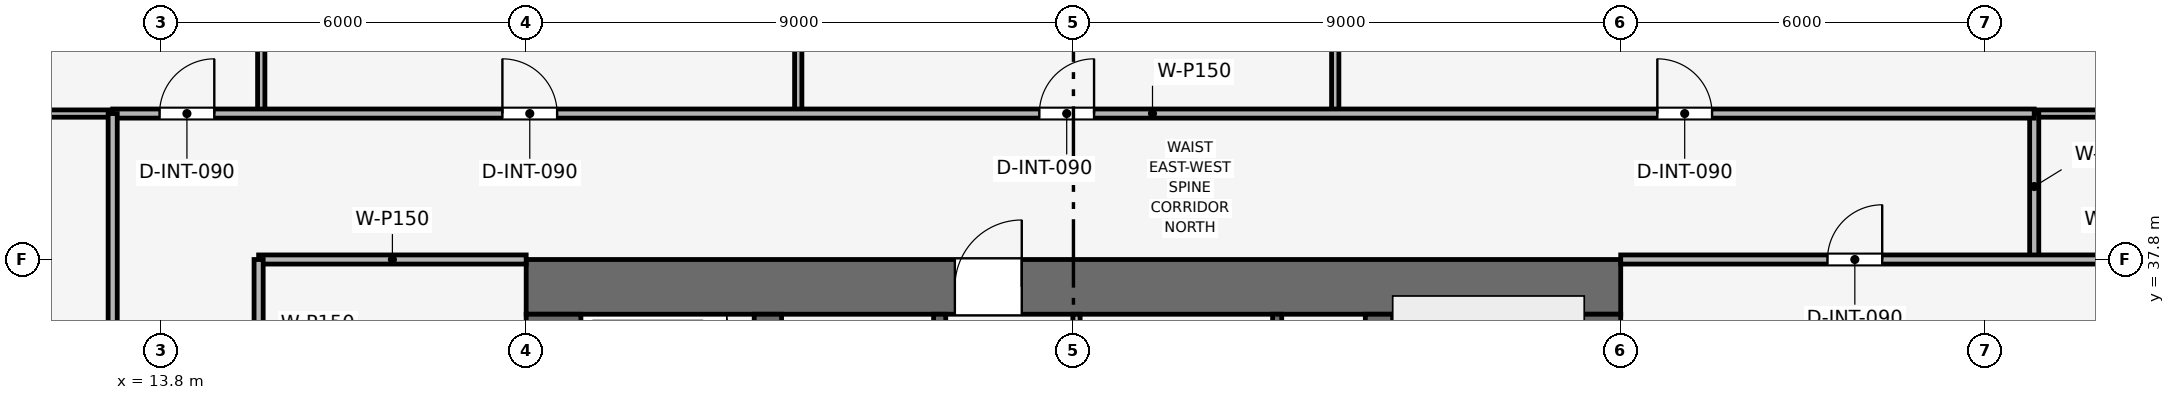
"""IFC4 building model, lengths in metres.
Left out: names, types, materials, properties, quantities, classifications, styles, units other than length and angle.
Written with IfcOpenShell. Run it as: python <this file> out.ifc"""

import sys

from ifc_helpers import new_model, si_unit, direction, frame, frame_2d, origin, place, context, subcontext, project, spatial, rectangle, extrude, element, fill, save


model = new_model("IFC4")
c1 = context("Model", 3, precision=1e-05, world=origin(), true_north=direction((0.0, 1.0)))
c2 = subcontext(c1, "Body", "Model", "MODEL_VIEW")
j1 = project(units=[si_unit("LENGTHUNIT", "METRE"), si_unit("PLANEANGLEUNIT", "RADIAN")], contexts=[c1])
p1 = place(None, origin())
s1 = spatial("IfcSite", under=j1, at=p1, CompositionType="ELEMENT")
p2 = place(p1, origin())
s2 = spatial("IfcBuilding", under=s1, at=p2, CompositionType="ELEMENT")
p3 = place(p2, frame((0.0, 0.0, 164.55)))
s3 = spatial("IfcBuildingStorey", under=s2, at=p3, CompositionType="ELEMENT", Elevation=164.55)
p4 = place(p3, frame((19.8, 37.35, 0.0), z_axis=(0.0, 0.0, 1.0), x_axis=(1.0, 0.0, 0.0)))
e1 = element("IfcWall", 1, at=p4, inside=s3, PredefinedType="SHEAR", context=c2, shape_type="SweptSolid", body=[
    extrude(rectangle(XDim=18.0, YDim=0.9, at=frame_2d((9.0, 0.0))), origin(), (0.0, 0.0, 1.0), 3.75),
])
p5 = place(p4, frame((7.05, 0.0, 0.0)))
e2 = element("IfcOpeningElement", 2, at=p5, cuts=e1, PredefinedType="OPENING", context=c2, shape_type="SweptSolid", body=[
    extrude(rectangle(XDim=1.1, YDim=2.15, at=frame_2d((0.55, 1.075))), frame((0.0, 0.46, 0.0), z_axis=(0.0, -1.0, 0.0), x_axis=(1.0, 0.0, 0.0)), (0.0, 0.0, 1.0), 0.92),
])
p6 = place(p3, frame((20.25, 20.7, 0.0), z_axis=(0.0, 0.0, 1.0), x_axis=(0.0, 1.0, 0.0)))
e3 = element("IfcWall", 3, at=p6, inside=s3, PredefinedType="SHEAR", context=c2, shape_type="SweptSolid", body=[
    extrude(rectangle(XDim=16.2, YDim=0.9, at=frame_2d((8.1, 0.0))), origin(), (0.0, 0.0, 1.0), 3.75),
])
p7 = place(p6, frame((10.1, 0.0, 0.0)))
e4 = element("IfcOpeningElement", 4, at=p7, cuts=e3, PredefinedType="OPENING", context=c2, shape_type="SweptSolid", body=[
    extrude(rectangle(XDim=1.1, YDim=2.15, at=frame_2d((0.55, 1.075))), frame((0.0, 0.46, 0.0), z_axis=(0.0, -1.0, 0.0), x_axis=(1.0, 0.0, 0.0)), (0.0, 0.0, 1.0), 0.92),
])
p8 = place(p3, frame((37.35, 20.7, 0.0), z_axis=(0.0, 0.0, 1.0), x_axis=(0.0, 1.0, 0.0)))
e5 = element("IfcWall", 5, at=p8, inside=s3, PredefinedType="SHEAR", context=c2, shape_type="SweptSolid", body=[
    extrude(rectangle(XDim=16.2, YDim=0.9, at=frame_2d((8.1, 0.0))), origin(), (0.0, 0.0, 1.0), 3.75),
])
p9 = place(p8, frame((4.6, 0.0, 0.0)))
e6 = element("IfcOpeningElement", 6, at=p9, cuts=e5, PredefinedType="OPENING", context=c2, shape_type="SweptSolid", body=[
    extrude(rectangle(XDim=1.1, YDim=2.15, at=frame_2d((0.55, 1.075))), frame((0.0, 0.46, 0.0), z_axis=(0.0, -1.0, 0.0), x_axis=(1.0, 0.0, 0.0)), (0.0, 0.0, 1.0), 0.92),
])
for number, where, z_axis, x_axis in (
    (7, (23.775, 20.7, 0.0), (0.0, 0.0, 1.0), (0.0, 1.0, 0.0)),
    (8, (33.825, 20.7, 0.0), (0.0, 0.0, 1.0), (0.0, 1.0, 0.0)),
):
    element("IfcWall", number, at=place(p3, frame(where, z_axis=z_axis, x_axis=x_axis)), inside=s3, PredefinedType="SHEAR", context=c2, shape_type="SweptSolid", body=[
        extrude(rectangle(XDim=16.2, YDim=0.45, at=frame_2d((8.1, 0.0))), origin(), (0.0, 0.0, 1.0), 3.75),
    ])
p10 = place(p3, frame((32.15, 34.0, 0.0), z_axis=(0.0, 0.0, 1.0), x_axis=(0.0, 1.0, 0.0)))
e9 = element("IfcWall", 9, at=p10, inside=s3, PredefinedType="SHEAR", context=c2, shape_type="SweptSolid", body=[
    extrude(rectangle(XDim=2.9, YDim=0.15, at=frame_2d((1.45, 0.0))), origin(), (0.0, 0.0, 1.0), 3.495),
])
p11 = place(p3, frame((26.6, 34.0, 0.0), z_axis=(0.0, 0.0, 1.0), x_axis=(0.0, 1.0, 0.0)))
e10 = element("IfcWall", 10, at=p11, inside=s3, PredefinedType="SHEAR", context=c2, shape_type="SweptSolid", body=[
    extrude(rectangle(XDim=2.9, YDim=0.2, at=frame_2d((1.45, 0.0))), origin(), (0.0, 0.0, 1.0), 3.495),
])
p12 = place(p11, frame((0.75, 0.0, 0.0)))
e11 = element("IfcOpeningElement", 11, at=p12, cuts=e10, PredefinedType="OPENING", context=c2, shape_type="SweptSolid", body=[
    extrude(rectangle(XDim=1.1, YDim=2.15, at=frame_2d((0.55, 1.075))), frame((0.0, 0.11, 0.0), z_axis=(0.0, -1.0, 0.0), x_axis=(1.0, 0.0, 0.0)), (0.0, 0.0, 1.0), 0.22),
])
p13 = place(p3, frame((28.85, 33.925, 0.0), z_axis=(0.0, 0.0, 1.0), x_axis=(0.0, 1.0, 0.0)))
e12 = element("IfcWall", 12, at=p13, inside=s3, PredefinedType="PARTITIONING", context=c2, shape_type="SweptSolid", body=[
    extrude(rectangle(XDim=2.975, YDim=0.12, at=frame_2d((1.487, 0.0))), origin(), (0.0, 0.0, 1.0), 3.495),
])
p14 = place(p13, frame((0.25, 0.0, 0.0)))
e13 = element("IfcOpeningElement", 13, at=p14, cuts=e12, PredefinedType="OPENING", context=c2, shape_type="SweptSolid", body=[
    extrude(rectangle(XDim=0.85, YDim=2.1, at=frame_2d((0.425, 1.05))), frame((0.0, 0.07, 0.0), z_axis=(0.0, -1.0, 0.0), x_axis=(1.0, 0.0, 0.0)), (0.0, 0.0, 1.0), 0.14),
])
p15 = place(p13, frame((1.645, 0.0, 0.0)))
e14 = element("IfcOpeningElement", 14, at=p15, cuts=e12, PredefinedType="OPENING", context=c2, shape_type="SweptSolid", body=[
    extrude(rectangle(XDim=0.85, YDim=2.1, at=frame_2d((0.425, 1.05))), frame((0.0, 0.07, 0.0), z_axis=(0.0, -1.0, 0.0), x_axis=(1.0, 0.0, 0.0)), (0.0, 0.0, 1.0), 0.14),
])
p16 = place(p3, frame((15.4, 37.8, 0.0), z_axis=(0.0, 0.0, 1.0), x_axis=(1.0, 0.0, 0.0)))
e15 = element("IfcWall", 15, at=p16, inside=s3, PredefinedType="PARTITIONING", context=c2, shape_type="SweptSolid", body=[
    extrude(rectangle(XDim=4.4, YDim=0.15, at=frame_2d((2.2, 0.0))), origin(), (0.0, 0.0, 1.0), 3.03),
])
p17 = place(p3, frame((15.4, 32.45, 0.0), z_axis=(0.0, 0.0, 1.0), x_axis=(0.0, 1.0, 0.0)))
e16 = element("IfcWall", 16, at=p17, inside=s3, PredefinedType="PARTITIONING", context=c2, shape_type="SweptSolid", body=[
    extrude(rectangle(XDim=5.35, YDim=0.15, at=frame_2d((2.675, 0.0))), origin(), (0.0, 0.0, 1.0), 3.03),
])
p18 = place(p17, frame((2.1, 0.0, 0.0)))
e17 = element("IfcOpeningElement", 17, at=p18, cuts=e16, PredefinedType="OPENING", context=c2, shape_type="SweptSolid", body=[
    extrude(rectangle(XDim=0.9, YDim=2.1, at=frame_2d((0.45, 1.05))), frame((0.0, 0.085, 0.0), z_axis=(0.0, -1.0, 0.0), x_axis=(1.0, 0.0, 0.0)), (0.0, 0.0, 1.0), 0.17),
])
for number, where, z_axis, x_axis in (
    (18, (15.443, 40.2, 0.0), (0.0, 0.0, 1.0), (0.0, 1.0, 0.0)),
    (19, (24.274, 40.2, 0.0), (0.0, 0.0, 1.0), (0.0, 1.0, 0.0)),
    (20, (33.105, 40.2, 0.0), (0.0, 0.0, 1.0), (0.0, 1.0, 0.0)),
):
    element("IfcWall", number, at=place(p3, frame(where, z_axis=z_axis, x_axis=x_axis)), inside=s3, PredefinedType="PARTITIONING", context=c2, shape_type="SweptSolid", body=[
        extrude(rectangle(XDim=12.77, YDim=0.12, at=frame_2d((6.385, 0.0))), origin(), (0.0, 0.0, 1.0), 2.98),
    ])
p19 = place(p3, frame((4.63, 40.2, 0.0), z_axis=(0.0, 0.0, 1.0), x_axis=(1.0, 0.0, 0.0)))
e21 = element("IfcWall", 21, at=p19, inside=s3, PredefinedType="PARTITIONING", context=c2, shape_type="SweptSolid", body=[
    extrude(rectangle(XDim=8.37, YDim=0.12, at=frame_2d((4.185, 0.0))), origin(), (0.0, 0.0, 1.0), 2.98),
])
p20 = place(p3, frame((44.6, 40.2, 0.0), z_axis=(0.0, 0.0, 1.0), x_axis=(1.0, 0.0, 0.0)))
e22 = element("IfcWall", 22, at=p20, inside=s3, PredefinedType="PARTITIONING", context=c2, shape_type="SweptSolid", body=[
    extrude(rectangle(XDim=8.37, YDim=0.12, at=frame_2d((4.185, 0.0))), origin(), (0.0, 0.0, 1.0), 2.98),
])
p21 = place(p3, frame((44.6, 37.8, 0.0), z_axis=(0.0, 0.0, 1.0), x_axis=(0.0, 1.0, 0.0)))
e23 = element("IfcWall", 23, at=p21, inside=s3, PredefinedType="PARTITIONING", context=c2, shape_type="SweptSolid", body=[
    extrude(rectangle(XDim=2.4, YDim=0.15, at=frame_2d((1.2, 0.0))), origin(), (0.0, 0.0, 1.0), 3.495),
])
p22 = place(p3, frame((37.8, 37.8, 0.0), z_axis=(0.0, 0.0, 1.0), x_axis=(1.0, 0.0, 0.0)))
e24 = element("IfcWall", 24, at=p22, inside=s3, PredefinedType="PARTITIONING", context=c2, shape_type="SweptSolid", body=[
    extrude(rectangle(XDim=15.17, YDim=0.15, at=frame_2d((7.585, 0.0))), origin(), (0.0, 0.0, 1.0), 2.98),
])
p23 = place(p22, frame((3.4, 0.0, 0.0)))
e25 = element("IfcOpeningElement", 25, at=p23, cuts=e24, PredefinedType="OPENING", context=c2, shape_type="SweptSolid", body=[
    extrude(rectangle(XDim=0.9, YDim=2.1, at=frame_2d((0.45, 1.05))), frame((0.0, 0.085, 0.0), z_axis=(0.0, -1.0, 0.0), x_axis=(1.0, 0.0, 0.0)), (0.0, 0.0, 1.0), 0.17),
])
p24 = place(p3, frame((13.0, 40.2, 0.0), z_axis=(0.0, 0.0, 1.0), x_axis=(1.0, 0.0, 0.0)))
e26 = element("IfcWall", 26, at=p24, inside=s3, PredefinedType="PARTITIONING", context=c2, shape_type="SweptSolid", body=[
    extrude(rectangle(XDim=31.6, YDim=0.15, at=frame_2d((15.8, 0.0))), origin(), (0.0, 0.0, 1.0), 3.03),
])
p25 = place(p24, frame((0.771, 0.0, 0.0)))
e27 = element("IfcOpeningElement", 27, at=p25, cuts=e26, PredefinedType="OPENING", context=c2, shape_type="SweptSolid", body=[
    extrude(rectangle(XDim=0.9, YDim=2.1, at=frame_2d((0.45, 1.05))), frame((0.0, 0.085, 0.0), z_axis=(0.0, -1.0, 0.0), x_axis=(1.0, 0.0, 0.0)), (0.0, 0.0, 1.0), 0.17),
])
p26 = place(p24, frame((6.409, 0.0, 0.0)))
e28 = element("IfcOpeningElement", 28, at=p26, cuts=e26, PredefinedType="OPENING", context=c2, shape_type="SweptSolid", body=[
    extrude(rectangle(XDim=0.9, YDim=2.1, at=frame_2d((0.45, 1.05))), frame((0.0, 0.085, 0.0), z_axis=(0.0, -1.0, 0.0), x_axis=(1.0, 0.0, 0.0)), (0.0, 0.0, 1.0), 0.17),
])
p27 = place(p24, frame((15.239, 0.0, 0.0)))
e29 = element("IfcOpeningElement", 29, at=p27, cuts=e26, PredefinedType="OPENING", context=c2, shape_type="SweptSolid", body=[
    extrude(rectangle(XDim=0.9, YDim=2.1, at=frame_2d((0.45, 1.05))), frame((0.0, 0.085, 0.0), z_axis=(0.0, -1.0, 0.0), x_axis=(1.0, 0.0, 0.0)), (0.0, 0.0, 1.0), 0.17),
])
p28 = place(p24, frame((25.402, 0.0, 0.0)))
e30 = element("IfcOpeningElement", 30, at=p28, cuts=e26, PredefinedType="OPENING", context=c2, shape_type="SweptSolid", body=[
    extrude(rectangle(XDim=0.9, YDim=2.1, at=frame_2d((0.45, 1.05))), frame((0.0, 0.085, 0.0), z_axis=(0.0, -1.0, 0.0), x_axis=(1.0, 0.0, 0.0)), (0.0, 0.0, 1.0), 0.17),
])
p29 = place(p3, frame((13.0, 17.4, 0.0), z_axis=(0.0, 0.0, 1.0), x_axis=(0.0, 1.0, 0.0)))
e31 = element("IfcWall", 31, at=p29, inside=s3, PredefinedType="PARTITIONING", context=c2, shape_type="SweptSolid", body=[
    extrude(rectangle(XDim=22.8, YDim=0.15, at=frame_2d((11.4, 0.0))), origin(), (0.0, 0.0, 1.0), 3.03),
])
p30 = place(p29, frame((6.115, 0.0, 0.0)))
e32 = element("IfcOpeningElement", 32, at=p30, cuts=e31, PredefinedType="OPENING", context=c2, shape_type="SweptSolid", body=[
    extrude(rectangle(XDim=0.9, YDim=2.1, at=frame_2d((0.45, 1.05))), frame((0.0, 0.085, 0.0), z_axis=(0.0, -1.0, 0.0), x_axis=(1.0, 0.0, 0.0)), (0.0, 0.0, 1.0), 0.17),
])
p31 = place(p29, frame((15.115, 0.0, 0.0)))
e33 = element("IfcOpeningElement", 33, at=p31, cuts=e31, PredefinedType="OPENING", context=c2, shape_type="SweptSolid", body=[
    extrude(rectangle(XDim=0.9, YDim=2.1, at=frame_2d((0.45, 1.05))), frame((0.0, 0.085, 0.0), z_axis=(0.0, -1.0, 0.0), x_axis=(1.0, 0.0, 0.0)), (0.0, 0.0, 1.0), 0.17),
])
p32 = place(p23, origin())
e34 = element("IfcDoor", 34, at=p32, inside=s3, OperationType="SINGLE_SWING_RIGHT", PredefinedType="DOOR", context=c2, shape_type="SweptSolid", body=[
    extrude(rectangle(XDim=0.9, YDim=2.1, at=frame_2d((0.45, 1.05))), frame((0.0, 0.025, 0.0), z_axis=(0.0, -1.0, 0.0), x_axis=(1.0, 0.0, 0.0)), (0.0, 0.0, 1.0), 0.05),
])
fill(e25, e34)
p33 = place(p25, origin())
e35 = element("IfcDoor", 35, at=p33, inside=s3, OperationType="SINGLE_SWING_RIGHT", PredefinedType="DOOR", context=c2, shape_type="SweptSolid", body=[
    extrude(rectangle(XDim=0.9, YDim=2.1, at=frame_2d((0.45, 1.05))), frame((0.0, 0.025, 0.0), z_axis=(0.0, -1.0, 0.0), x_axis=(1.0, 0.0, 0.0)), (0.0, 0.0, 1.0), 0.05),
])
fill(e27, e35)
p34 = place(p26, origin())
e36 = element("IfcDoor", 36, at=p34, inside=s3, OperationType="SINGLE_SWING_LEFT", PredefinedType="DOOR", context=c2, shape_type="SweptSolid", body=[
    extrude(rectangle(XDim=0.9, YDim=2.1, at=frame_2d((0.45, 1.05))), frame((0.0, 0.025, 0.0), z_axis=(0.0, -1.0, 0.0), x_axis=(1.0, 0.0, 0.0)), (0.0, 0.0, 1.0), 0.05),
])
fill(e28, e36)
p35 = place(p27, origin())
e37 = element("IfcDoor", 37, at=p35, inside=s3, OperationType="SINGLE_SWING_RIGHT", PredefinedType="DOOR", context=c2, shape_type="SweptSolid", body=[
    extrude(rectangle(XDim=0.9, YDim=2.1, at=frame_2d((0.45, 1.05))), frame((0.0, 0.025, 0.0), z_axis=(0.0, -1.0, 0.0), x_axis=(1.0, 0.0, 0.0)), (0.0, 0.0, 1.0), 0.05),
])
fill(e29, e37)
p36 = place(p28, origin())
e38 = element("IfcDoor", 38, at=p36, inside=s3, OperationType="SINGLE_SWING_LEFT", PredefinedType="DOOR", context=c2, shape_type="SweptSolid", body=[
    extrude(rectangle(XDim=0.9, YDim=2.1, at=frame_2d((0.45, 1.05))), frame((0.0, 0.025, 0.0), z_axis=(0.0, -1.0, 0.0), x_axis=(1.0, 0.0, 0.0)), (0.0, 0.0, 1.0), 0.05),
])
fill(e30, e38)
p37 = place(p5, origin())
e39 = element("IfcDoor", 39, at=p37, inside=s3, OperationType="SINGLE_SWING_RIGHT", PredefinedType="DOOR", context=c2, shape_type="SweptSolid", body=[
    extrude(rectangle(XDim=1.1, YDim=2.15, at=frame_2d((0.55, 1.075))), frame((0.0, 0.025, 0.0), z_axis=(0.0, -1.0, 0.0), x_axis=(1.0, 0.0, 0.0)), (0.0, 0.0, 1.0), 0.05),
])
fill(e2, e39)
save(model, sys.argv[1])
